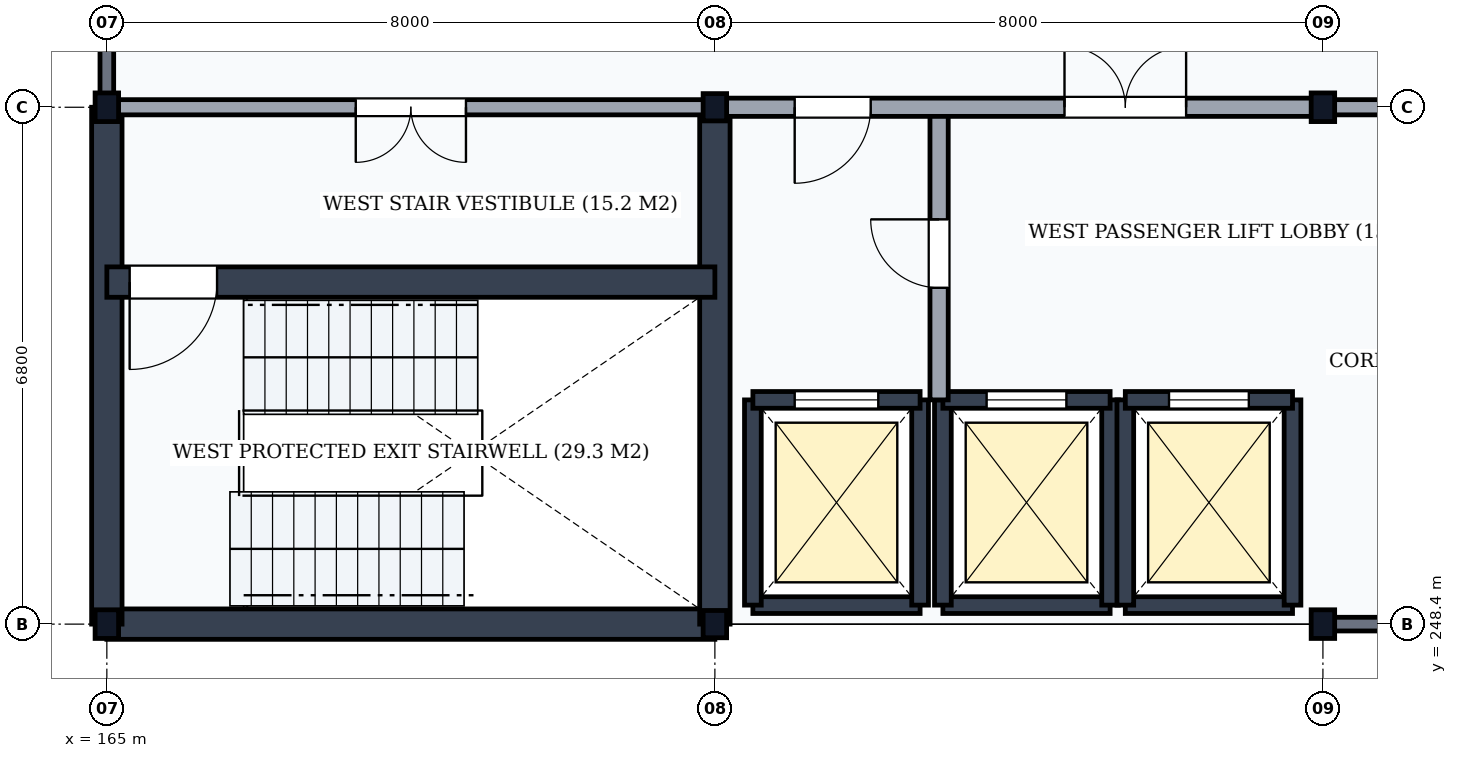
"""IFC4 building model, lengths in metres.
Left out: names, types, materials, properties, quantities, classifications, styles, units other than length and angle.
Written with IfcOpenShell. Run it as: python <this file> out.ifc"""

import sys

from ifc_helpers import new_model, si_unit, direction, frame, frame_2d, origin, origin_2d, place, context, subcontext, project, spatial, rectangle, i_section, extrude, element, fill, save


model = new_model("IFC4")
c1 = context("Model", 3, precision=1e-05, world=origin(), true_north=direction((0.0, 1.0)))
c2 = subcontext(c1, "Body", "Model", "MODEL_VIEW")
j1 = project(units=[si_unit("LENGTHUNIT", "METRE"), si_unit("PLANEANGLEUNIT", "RADIAN")], contexts=[c1])
p1 = place(None, origin())
s1 = spatial("IfcSite", under=j1, at=p1, CompositionType="ELEMENT")
p2 = place(p1, origin())
s2 = spatial("IfcBuilding", under=s1, at=p2, CompositionType="ELEMENT")
p3 = place(p2, frame((0.0, 0.0, 43.8)))
s3 = spatial("IfcBuildingStorey", under=s2, at=p3, CompositionType="ELEMENT", Elevation=43.8)
for number, where, z_axis, x_axis in (
    (1, (165.0, 248.4, 0.0), (0.0, 0.0, 1.0), (1.0, 0.0, 0.0)),
    (2, (165.0, 255.2, 0.0), (0.0, 0.0, 1.0), (1.0, 0.0, 0.0)),
):
    element("IfcColumn", number, at=place(p3, frame(where, z_axis=z_axis, x_axis=x_axis)), inside=s3, PredefinedType="COLUMN", context=c2, shape_type="SweptSolid", body=[
        extrude(i_section(OverallWidth=0.309, OverallDepth=0.377, WebThickness=0.021, FlangeThickness=0.04, FilletRadius=0.027, at=origin_2d()), origin(), (0.0, 0.0, 1.0), 3.9),
    ])
for number, where, z_axis, x_axis in (
    (3, (173.0, 248.4, 0.0), (0.0, 0.0, 1.0), (1.0, 0.0, 0.0)),
    (4, (173.0, 255.2, 0.0), (0.0, 0.0, 1.0), (1.0, 0.0, 0.0)),
):
    element("IfcColumn", number, at=place(p3, frame(where, z_axis=z_axis, x_axis=x_axis)), inside=s3, PredefinedType="COLUMN", context=c2, shape_type="SweptSolid", body=[
        extrude(i_section(OverallWidth=0.309, OverallDepth=0.359, WebThickness=0.021, FlangeThickness=0.04, FilletRadius=0.027, at=origin_2d()), origin(), (0.0, 0.0, 1.0), 3.9),
    ])
for number, where, z_axis, x_axis in (
    (5, (181.0, 248.4, 0.0), (0.0, 0.0, 1.0), (1.0, 0.0, 0.0)),
    (6, (181.0, 255.2, 0.0), (0.0, 0.0, 1.0), (1.0, 0.0, 0.0)),
):
    element("IfcColumn", number, at=place(p3, frame(where, z_axis=z_axis, x_axis=x_axis)), inside=s3, PredefinedType="COLUMN", context=c2, shape_type="SweptSolid", body=[
        extrude(i_section(OverallWidth=0.309, OverallDepth=0.377, WebThickness=0.021, FlangeThickness=0.04, FilletRadius=0.027, at=origin_2d()), origin(), (0.0, 0.0, 1.0), 3.9),
    ])
p4 = place(p3, frame((181.006, 248.4, 0.0), z_axis=(0.0, 0.0, 1.0), x_axis=(1.0, 0.0, 0.0)))
e7 = element("IfcWall", 7, at=p4, inside=s3, PredefinedType="SOLIDWALL", context=c2, shape_type="SweptSolid", body=[
    extrude(rectangle(XDim=7.988, YDim=0.18, at=frame_2d((3.994, 0.0))), origin(), (0.0, 0.0, 1.0), 3.368),
])
p5 = place(p4, frame((3.319, 0.0, 0.85)))
e8 = element("IfcOpeningElement", 8, at=p5, cuts=e7, PredefinedType="OPENING", context=c2, shape_type="SweptSolid", body=[
    extrude(rectangle(XDim=0.75, YDim=2.0, at=frame_2d((0.375, 1.0))), frame((0.0, 0.105, 0.0), z_axis=(0.0, -1.0, 0.0), x_axis=(1.0, 0.0, 0.0)), (0.0, 0.0, 1.0), 0.21),
])
p6 = place(p3, frame((165.0, 255.206, 0.0), z_axis=(0.0, 0.0, 1.0), x_axis=(0.0, 1.0, 0.0)))
e9 = element("IfcWall", 9, at=p6, inside=s3, PredefinedType="SOLIDWALL", context=c2, shape_type="SweptSolid", body=[
    extrude(rectangle(XDim=7.588, YDim=0.18, at=frame_2d((3.794, 0.0))), origin(), (0.0, 0.0, 1.0), 3.408),
])
p7 = place(p3, frame((165.0, 248.4, 0.0), z_axis=(0.0, 0.0, 1.0), x_axis=(1.0, 0.0, 0.0)))
e10 = element("IfcWall", 10, at=p7, inside=s3, PredefinedType="SHEAR", context=c2, shape_type="SweptSolid", body=[
    extrude(rectangle(XDim=8.0, YDim=0.4, at=frame_2d((4.0, 0.0))), origin(), (0.0, 0.0, 1.0), 3.68),
])
for number, where, z_axis, x_axis in (
    (11, (165.0, 248.4, 0.0), (0.0, 0.0, 1.0), (0.0, 1.0, 0.0)),
    (12, (173.0, 248.4, 0.0), (0.0, 0.0, 1.0), (0.0, 1.0, 0.0)),
):
    element("IfcWall", number, at=place(p3, frame(where, z_axis=z_axis, x_axis=x_axis)), inside=s3, PredefinedType="SHEAR", context=c2, shape_type="SweptSolid", body=[
        extrude(rectangle(XDim=6.8, YDim=0.4, at=frame_2d((3.4, 0.0))), origin(), (0.0, 0.0, 1.0), 3.68),
    ])
p8 = place(p3, frame((165.0, 252.9, 0.0), z_axis=(0.0, 0.0, 1.0), x_axis=(1.0, 0.0, 0.0)))
e13 = element("IfcWall", 13, at=p8, inside=s3, PredefinedType="SHEAR", context=c2, shape_type="SweptSolid", body=[
    extrude(rectangle(XDim=8.0, YDim=0.4, at=frame_2d((4.0, 0.0))), origin(), (0.0, 0.0, 1.0), 3.68),
])
p9 = place(p8, frame((0.3, 0.0, 0.0)))
e14 = element("IfcOpeningElement", 14, at=p9, cuts=e13, PredefinedType="OPENING", context=c2, shape_type="SweptSolid", body=[
    extrude(rectangle(XDim=1.15, YDim=2.15, at=frame_2d((0.575, 1.075))), frame((0.0, 0.215, 0.0), z_axis=(0.0, -1.0, 0.0), x_axis=(1.0, 0.0, 0.0)), (0.0, 0.0, 1.0), 0.43),
])
p10 = place(p3, frame((165.0, 255.2, 0.0), z_axis=(0.0, 0.0, 1.0), x_axis=(1.0, 0.0, 0.0)))
e15 = element("IfcWall", 15, at=p10, inside=s3, PredefinedType="PARTITIONING", context=c2, shape_type="SweptSolid", body=[
    extrude(rectangle(XDim=8.0, YDim=0.2, at=frame_2d((4.0, 0.0))), origin(), (0.0, 0.0, 1.0), 3.178),
])
p11 = place(p10, frame((3.275, 0.0, 0.0)))
e16 = element("IfcOpeningElement", 16, at=p11, cuts=e15, PredefinedType="OPENING", context=c2, shape_type="SweptSolid", body=[
    extrude(rectangle(XDim=1.45, YDim=2.2, at=frame_2d((0.725, 1.1))), frame((0.0, 0.115, 0.0), z_axis=(0.0, -1.0, 0.0), x_axis=(1.0, 0.0, 0.0)), (0.0, 0.0, 1.0), 0.23),
])
p12 = place(p3, frame((173.5, 248.65, 0.0), z_axis=(0.0, 0.0, 1.0), x_axis=(1.0, 0.0, 0.0)))
e17 = element("IfcWall", 17, at=p12, inside=s3, PredefinedType="SHEAR", context=c2, shape_type="SweptSolid", body=[
    extrude(rectangle(XDim=2.2, YDim=0.22, at=frame_2d((1.1, 0.0))), origin(), (0.0, 0.0, 1.0), 3.68),
])
for number, where, z_axis, x_axis in (
    (18, (173.5, 248.65, 0.0), (0.0, 0.0, 1.0), (0.0, 1.0, 0.0)),
    (19, (175.7, 248.65, 0.0), (0.0, 0.0, 1.0), (0.0, 1.0, 0.0)),
):
    element("IfcWall", number, at=place(p3, frame(where, z_axis=z_axis, x_axis=x_axis)), inside=s3, PredefinedType="SHEAR", context=c2, shape_type="SweptSolid", body=[
        extrude(rectangle(XDim=2.7, YDim=0.22, at=frame_2d((1.35, 0.0))), origin(), (0.0, 0.0, 1.0), 3.68),
    ])
p13 = place(p3, frame((173.5, 251.35, 0.0), z_axis=(0.0, 0.0, 1.0), x_axis=(1.0, 0.0, 0.0)))
e20 = element("IfcWall", 20, at=p13, inside=s3, PredefinedType="SHEAR", context=c2, shape_type="SweptSolid", body=[
    extrude(rectangle(XDim=2.2, YDim=0.22, at=frame_2d((1.1, 0.0))), origin(), (0.0, 0.0, 1.0), 3.68),
])
p14 = place(p13, frame((0.55, 0.0, 0.0)))
e21 = element("IfcOpeningElement", 21, at=p14, cuts=e20, PredefinedType="OPENING", context=c2, shape_type="SweptSolid", body=[
    extrude(rectangle(XDim=1.1, YDim=2.15, at=frame_2d((0.55, 1.075))), frame((0.0, 0.125, 0.0), z_axis=(0.0, -1.0, 0.0), x_axis=(1.0, 0.0, 0.0)), (0.0, 0.0, 1.0), 0.25),
])
p15 = place(p3, frame((176.0, 248.65, 0.0), z_axis=(0.0, 0.0, 1.0), x_axis=(1.0, 0.0, 0.0)))
e22 = element("IfcWall", 22, at=p15, inside=s3, PredefinedType="SHEAR", context=c2, shape_type="SweptSolid", body=[
    extrude(rectangle(XDim=2.2, YDim=0.22, at=frame_2d((1.1, 0.0))), origin(), (0.0, 0.0, 1.0), 3.68),
])
for number, where, z_axis, x_axis in (
    (23, (176.0, 248.65, 0.0), (0.0, 0.0, 1.0), (0.0, 1.0, 0.0)),
    (24, (178.2, 248.65, 0.0), (0.0, 0.0, 1.0), (0.0, 1.0, 0.0)),
):
    element("IfcWall", number, at=place(p3, frame(where, z_axis=z_axis, x_axis=x_axis)), inside=s3, PredefinedType="SHEAR", context=c2, shape_type="SweptSolid", body=[
        extrude(rectangle(XDim=2.7, YDim=0.22, at=frame_2d((1.35, 0.0))), origin(), (0.0, 0.0, 1.0), 3.68),
    ])
p16 = place(p3, frame((176.0, 251.35, 0.0), z_axis=(0.0, 0.0, 1.0), x_axis=(1.0, 0.0, 0.0)))
e25 = element("IfcWall", 25, at=p16, inside=s3, PredefinedType="SHEAR", context=c2, shape_type="SweptSolid", body=[
    extrude(rectangle(XDim=2.2, YDim=0.22, at=frame_2d((1.1, 0.0))), origin(), (0.0, 0.0, 1.0), 3.68),
])
p17 = place(p16, frame((0.575, 0.0, 0.0)))
e26 = element("IfcOpeningElement", 26, at=p17, cuts=e25, PredefinedType="OPENING", context=c2, shape_type="SweptSolid", body=[
    extrude(rectangle(XDim=1.05, YDim=2.15, at=frame_2d((0.525, 1.075))), frame((0.0, 0.125, 0.0), z_axis=(0.0, -1.0, 0.0), x_axis=(1.0, 0.0, 0.0)), (0.0, 0.0, 1.0), 0.25),
])
p18 = place(p3, frame((178.4, 248.65, 0.0), z_axis=(0.0, 0.0, 1.0), x_axis=(1.0, 0.0, 0.0)))
e27 = element("IfcWall", 27, at=p18, inside=s3, PredefinedType="SHEAR", context=c2, shape_type="SweptSolid", body=[
    extrude(rectangle(XDim=2.2, YDim=0.22, at=frame_2d((1.1, 0.0))), origin(), (0.0, 0.0, 1.0), 3.68),
])
for number, where, z_axis, x_axis in (
    (28, (178.4, 248.65, 0.0), (0.0, 0.0, 1.0), (0.0, 1.0, 0.0)),
    (29, (180.6, 248.65, 0.0), (0.0, 0.0, 1.0), (0.0, 1.0, 0.0)),
):
    element("IfcWall", number, at=place(p3, frame(where, z_axis=z_axis, x_axis=x_axis)), inside=s3, PredefinedType="SHEAR", context=c2, shape_type="SweptSolid", body=[
        extrude(rectangle(XDim=2.7, YDim=0.22, at=frame_2d((1.35, 0.0))), origin(), (0.0, 0.0, 1.0), 3.68),
    ])
p19 = place(p3, frame((178.4, 251.35, 0.0), z_axis=(0.0, 0.0, 1.0), x_axis=(1.0, 0.0, 0.0)))
e30 = element("IfcWall", 30, at=p19, inside=s3, PredefinedType="SHEAR", context=c2, shape_type="SweptSolid", body=[
    extrude(rectangle(XDim=2.2, YDim=0.22, at=frame_2d((1.1, 0.0))), origin(), (0.0, 0.0, 1.0), 3.68),
])
p20 = place(p19, frame((0.575, 0.0, 0.0)))
e31 = element("IfcOpeningElement", 31, at=p20, cuts=e30, PredefinedType="OPENING", context=c2, shape_type="SweptSolid", body=[
    extrude(rectangle(XDim=1.05, YDim=2.15, at=frame_2d((0.525, 1.075))), frame((0.0, 0.125, 0.0), z_axis=(0.0, -1.0, 0.0), x_axis=(1.0, 0.0, 0.0)), (0.0, 0.0, 1.0), 0.25),
])
p21 = place(p3, frame((175.95, 251.35, 0.0), z_axis=(0.0, 0.0, 1.0), x_axis=(0.0, 1.0, 0.0)))
e32 = element("IfcWall", 32, at=p21, inside=s3, PredefinedType="PARTITIONING", context=c2, shape_type="SweptSolid", body=[
    extrude(rectangle(XDim=3.85, YDim=0.24, at=frame_2d((1.925, 0.0))), origin(), (0.0, 0.0, 1.0), 3.68),
])
p22 = place(p21, frame((1.475, 0.0, 0.0)))
e33 = element("IfcOpeningElement", 33, at=p22, cuts=e32, PredefinedType="OPENING", context=c2, shape_type="SweptSolid", body=[
    extrude(rectangle(XDim=0.9, YDim=2.1, at=frame_2d((0.45, 1.05))), frame((0.0, 0.135, 0.0), z_axis=(0.0, -1.0, 0.0), x_axis=(1.0, 0.0, 0.0)), (0.0, 0.0, 1.0), 0.27),
])
p23 = place(p3, frame((173.0, 255.2, 0.0), z_axis=(0.0, 0.0, 1.0), x_axis=(1.0, 0.0, 0.0)))
e34 = element("IfcWall", 34, at=p23, inside=s3, PredefinedType="PARTITIONING", context=c2, shape_type="SweptSolid", body=[
    extrude(rectangle(XDim=8.0, YDim=0.24, at=frame_2d((4.0, 0.0))), origin(), (0.0, 0.0, 1.0), 3.178),
])
p24 = place(p23, frame((1.05, 0.0, 0.0)))
e35 = element("IfcOpeningElement", 35, at=p24, cuts=e34, PredefinedType="OPENING", context=c2, shape_type="SweptSolid", body=[
    extrude(rectangle(XDim=1.0, YDim=2.1, at=frame_2d((0.5, 1.05))), frame((0.0, 0.135, 0.0), z_axis=(0.0, -1.0, 0.0), x_axis=(1.0, 0.0, 0.0)), (0.0, 0.0, 1.0), 0.27),
])
p25 = place(p23, frame((4.6, 0.0, 0.0)))
e36 = element("IfcOpeningElement", 36, at=p25, cuts=e34, PredefinedType="OPENING", context=c2, shape_type="SweptSolid", body=[
    extrude(rectangle(XDim=1.6, YDim=2.25, at=frame_2d((0.8, 1.125))), frame((0.0, 0.135, 0.0), z_axis=(0.0, -1.0, 0.0), x_axis=(1.0, 0.0, 0.0)), (0.0, 0.0, 1.0), 0.27),
])
p26 = place(p3, frame((181.0, 255.2, 0.0), z_axis=(0.0, 0.0, 1.0), x_axis=(1.0, 0.0, 0.0)))
e37 = element("IfcWall", 37, at=p26, inside=s3, PredefinedType="PARTITIONING", context=c2, shape_type="SweptSolid", body=[
    extrude(rectangle(XDim=8.0, YDim=0.2, at=frame_2d((4.0, 0.0))), origin(), (0.0, 0.0, 1.0), 3.178),
])
p27 = place(p26, frame((0.85, 0.0, 0.0)))
e38 = element("IfcOpeningElement", 38, at=p27, cuts=e37, PredefinedType="OPENING", context=c2, shape_type="SweptSolid", body=[
    extrude(rectangle(XDim=0.9, YDim=2.1, at=frame_2d((0.45, 1.05))), frame((0.0, 0.115, 0.0), z_axis=(0.0, -1.0, 0.0), x_axis=(1.0, 0.0, 0.0)), (0.0, 0.0, 1.0), 0.23),
])
p28 = place(p26, frame((3.25, 0.0, 0.0)))
e39 = element("IfcOpeningElement", 39, at=p28, cuts=e37, PredefinedType="OPENING", context=c2, shape_type="SweptSolid", body=[
    extrude(rectangle(XDim=0.9, YDim=2.1, at=frame_2d((0.45, 1.05))), frame((0.0, 0.115, 0.0), z_axis=(0.0, -1.0, 0.0), x_axis=(1.0, 0.0, 0.0)), (0.0, 0.0, 1.0), 0.23),
])
p29 = place(p26, frame((5.075, 0.0, 0.0)))
e40 = element("IfcOpeningElement", 40, at=p29, cuts=e37, PredefinedType="OPENING", context=c2, shape_type="SweptSolid", body=[
    extrude(rectangle(XDim=0.95, YDim=2.1, at=frame_2d((0.475, 1.05))), frame((0.0, 0.115, 0.0), z_axis=(0.0, -1.0, 0.0), x_axis=(1.0, 0.0, 0.0)), (0.0, 0.0, 1.0), 0.23),
])
p30 = place(p26, frame((6.5, 0.0, 0.0)))
e41 = element("IfcOpeningElement", 41, at=p30, cuts=e37, PredefinedType="OPENING", context=c2, shape_type="SweptSolid", body=[
    extrude(rectangle(XDim=0.85, YDim=2.1, at=frame_2d((0.425, 1.05))), frame((0.0, 0.115, 0.0), z_axis=(0.0, -1.0, 0.0), x_axis=(1.0, 0.0, 0.0)), (0.0, 0.0, 1.0), 0.23),
])
p31 = place(p9, frame((1.15, 0.0, 0.0), z_axis=(0.0, 0.0, 1.0), x_axis=(-1.0, 0.0, 0.0)))
e42 = element("IfcDoor", 42, at=p31, inside=s3, OperationType="SINGLE_SWING_RIGHT", PredefinedType="DOOR", context=c2, shape_type="SweptSolid", body=[
    extrude(rectangle(XDim=1.15, YDim=2.15, at=frame_2d((0.575, 1.075))), frame((0.0, 0.025, 0.0), z_axis=(0.0, -1.0, 0.0), x_axis=(1.0, 0.0, 0.0)), (0.0, 0.0, 1.0), 0.05),
])
fill(e14, e42)
p32 = place(p11, frame((1.45, 0.0, 0.0), z_axis=(0.0, 0.0, 1.0), x_axis=(-1.0, 0.0, 0.0)))
e43 = element("IfcDoor", 43, at=p32, inside=s3, OperationType="DOUBLE_DOOR_SINGLE_SWING", PredefinedType="DOOR", context=c2, shape_type="SweptSolid", body=[
    extrude(rectangle(XDim=1.45, YDim=2.2, at=frame_2d((0.725, 1.1))), frame((0.0, 0.025, 0.0), z_axis=(0.0, -1.0, 0.0), x_axis=(1.0, 0.0, 0.0)), (0.0, 0.0, 1.0), 0.05),
])
fill(e16, e43)
p33 = place(p14, origin())
e44 = element("IfcDoor", 44, at=p33, inside=s3, OperationType="DOUBLE_DOOR_SLIDING", PredefinedType="USERDEFINED", context=c2, shape_type="SweptSolid", body=[
    extrude(rectangle(XDim=1.1, YDim=2.15, at=frame_2d((0.55, 1.075))), frame((0.0, 0.025, 0.0), z_axis=(0.0, -1.0, 0.0), x_axis=(1.0, 0.0, 0.0)), (0.0, 0.0, 1.0), 0.05),
])
fill(e21, e44)
p34 = place(p17, origin())
e45 = element("IfcDoor", 45, at=p34, inside=s3, OperationType="DOUBLE_DOOR_SLIDING", PredefinedType="USERDEFINED", context=c2, shape_type="SweptSolid", body=[
    extrude(rectangle(XDim=1.05, YDim=2.15, at=frame_2d((0.525, 1.075))), frame((0.0, 0.025, 0.0), z_axis=(0.0, -1.0, 0.0), x_axis=(1.0, 0.0, 0.0)), (0.0, 0.0, 1.0), 0.05),
])
fill(e26, e45)
p35 = place(p20, origin())
e46 = element("IfcDoor", 46, at=p35, inside=s3, OperationType="DOUBLE_DOOR_SLIDING", PredefinedType="USERDEFINED", context=c2, shape_type="SweptSolid", body=[
    extrude(rectangle(XDim=1.05, YDim=2.15, at=frame_2d((0.525, 1.075))), frame((0.0, 0.025, 0.0), z_axis=(0.0, -1.0, 0.0), x_axis=(1.0, 0.0, 0.0)), (0.0, 0.0, 1.0), 0.05),
])
fill(e31, e46)
p36 = place(p22, frame((0.9, 0.0, 0.0), z_axis=(0.0, 0.0, 1.0), x_axis=(-1.0, 0.0, 0.0)))
e47 = element("IfcDoor", 47, at=p36, inside=s3, OperationType="SINGLE_SWING_LEFT", PredefinedType="DOOR", context=c2, shape_type="SweptSolid", body=[
    extrude(rectangle(XDim=0.9, YDim=2.1, at=frame_2d((0.45, 1.05))), frame((0.0, 0.025, 0.0), z_axis=(0.0, -1.0, 0.0), x_axis=(1.0, 0.0, 0.0)), (0.0, 0.0, 1.0), 0.05),
])
fill(e33, e47)
p37 = place(p24, frame((1.0, 0.0, 0.0), z_axis=(0.0, 0.0, 1.0), x_axis=(-1.0, 0.0, 0.0)))
e48 = element("IfcDoor", 48, at=p37, inside=s3, OperationType="SINGLE_SWING_RIGHT", PredefinedType="DOOR", context=c2, shape_type="SweptSolid", body=[
    extrude(rectangle(XDim=1.0, YDim=2.1, at=frame_2d((0.5, 1.05))), frame((0.0, 0.025, 0.0), z_axis=(0.0, -1.0, 0.0), x_axis=(1.0, 0.0, 0.0)), (0.0, 0.0, 1.0), 0.05),
])
fill(e35, e48)
p38 = place(p25, origin())
e49 = element("IfcDoor", 49, at=p38, inside=s3, OperationType="DOUBLE_DOOR_SINGLE_SWING", PredefinedType="DOOR", context=c2, shape_type="SweptSolid", body=[
    extrude(rectangle(XDim=1.6, YDim=2.25, at=frame_2d((0.8, 1.125))), frame((0.0, 0.025, 0.0), z_axis=(0.0, -1.0, 0.0), x_axis=(1.0, 0.0, 0.0)), (0.0, 0.0, 1.0), 0.05),
])
fill(e36, e49)
save(model, sys.argv[1])
